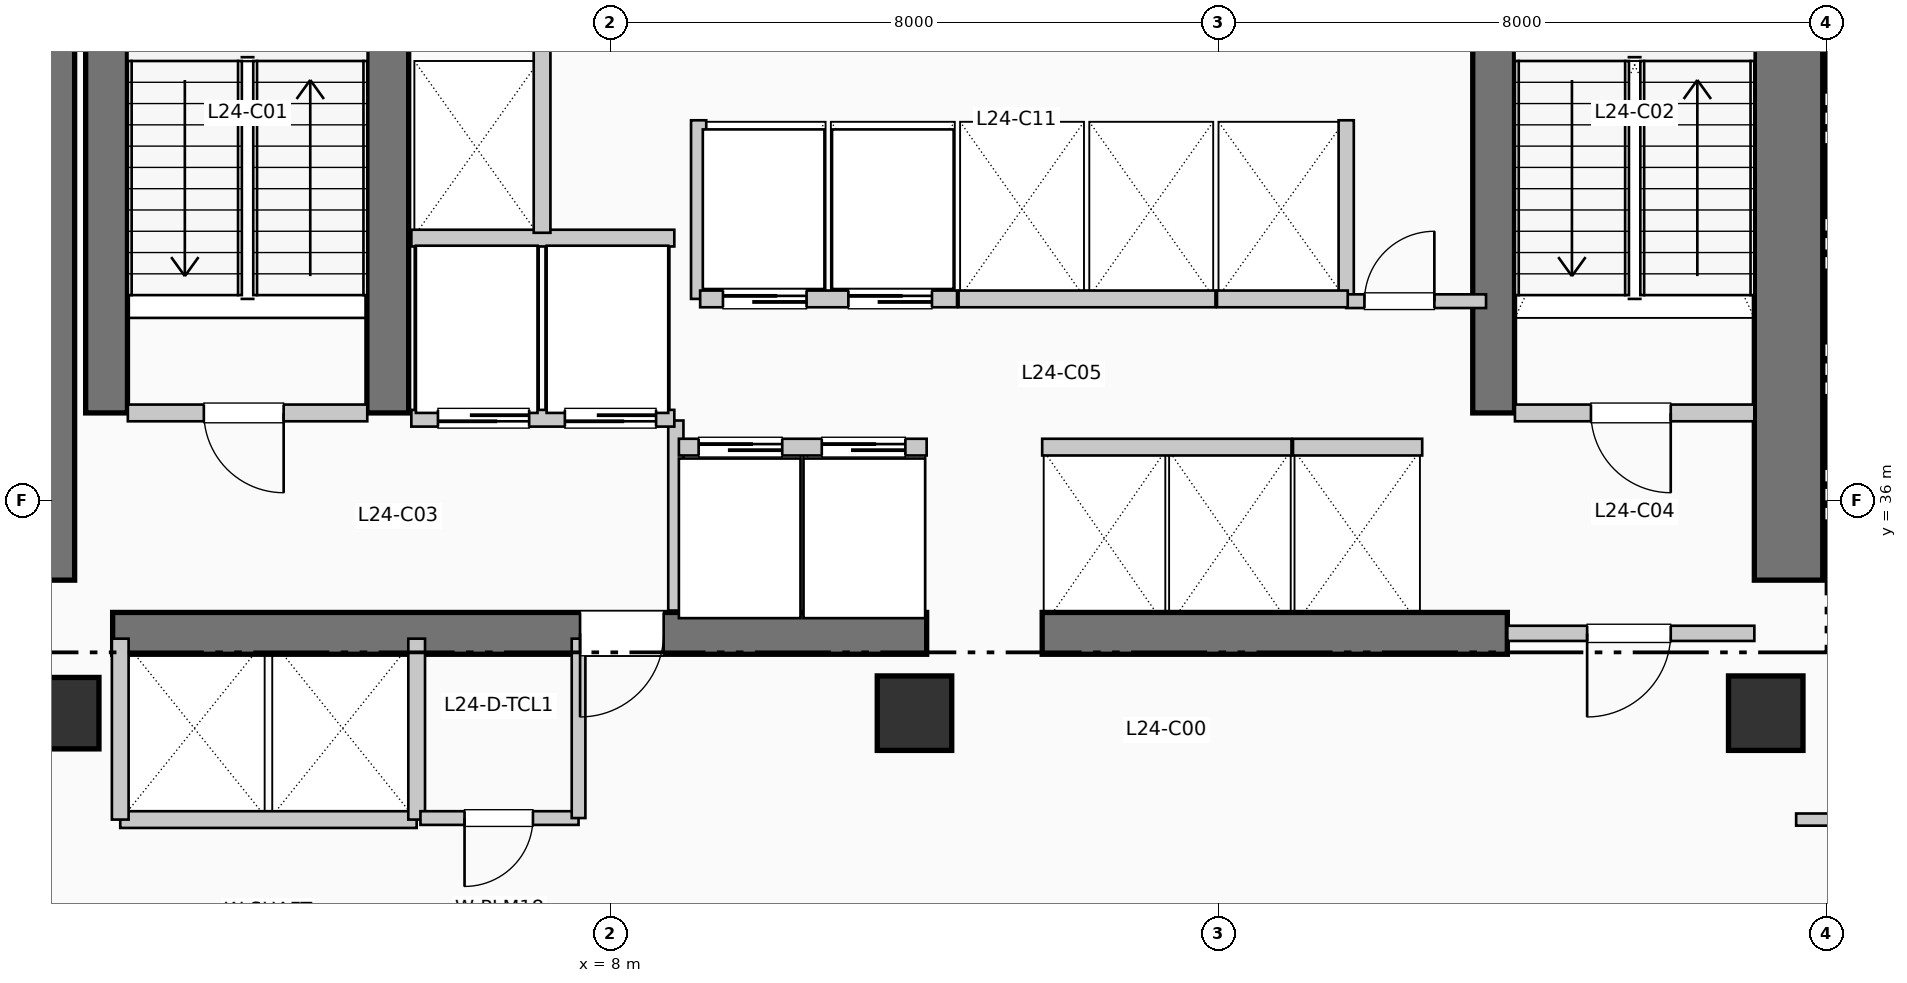
"""IFC4 building model, lengths in metres.
Left out: names, types, materials, properties, quantities, classifications, styles, units other than length and angle.
Written with IfcOpenShell. Run it as: python <this file> out.ifc"""

import sys

from ifc_helpers import new_model, si_unit, direction, frame, frame_2d, origin, origin_2d, place, context, subcontext, project, spatial, rectangle, extrude, element, fill, save


model = new_model("IFC4")
c1 = context("Model", 3, precision=1e-05, world=origin(), true_north=direction((0.0, 1.0)))
c2 = subcontext(c1, "Body", "Model", "MODEL_VIEW")
j1 = project(units=[si_unit("LENGTHUNIT", "METRE"), si_unit("PLANEANGLEUNIT", "RADIAN")], contexts=[c1])
p1 = place(None, origin())
s1 = spatial("IfcSite", under=j1, at=p1, CompositionType="ELEMENT")
p2 = place(p1, origin())
s2 = spatial("IfcBuilding", under=s1, at=p2, CompositionType="ELEMENT")
p3 = place(p2, frame((0.0, 0.0, 102.63)))
s3 = spatial("IfcBuildingStorey", under=s2, at=p3, CompositionType="ELEMENT", Elevation=102.63)
p4 = place(p3, frame((0.5, 34.95, 0.0), z_axis=(0.0, 0.0, 1.0), x_axis=(0.0, 1.0, 0.0)))
e1 = element("IfcWall", 1, at=p4, inside=s3, PredefinedType="SHEAR", context=c2, shape_type="SweptSolid", body=[
    extrude(rectangle(XDim=7.9, YDim=0.9, at=frame_2d((3.95, 0.0))), origin(), (0.0, 0.0, 1.0), 3.96),
])
p5 = place(p3, frame((23.5, 34.95, 0.0), z_axis=(0.0, 0.0, 1.0), x_axis=(0.0, 1.0, 0.0)))
e2 = element("IfcWall", 2, at=p5, inside=s3, PredefinedType="SHEAR", context=c2, shape_type="SweptSolid", body=[
    extrude(rectangle(XDim=10.64, YDim=0.9, at=frame_2d((5.32, 0.0))), origin(), (0.0, 0.0, 1.0), 3.96),
])
p6 = place(p3, frame((1.45, 34.25, 0.0), z_axis=(0.0, 0.0, 1.0), x_axis=(1.0, 0.0, 0.0)))
e3 = element("IfcWall", 3, at=p6, inside=s3, PredefinedType="SHEAR", context=c2, shape_type="SweptSolid", body=[
    extrude(rectangle(XDim=10.71, YDim=0.55, at=frame_2d((5.355, 0.0))), origin(), (0.0, 0.0, 1.0), 3.96),
])
p7 = place(p6, frame((7.25, 0.0, 0.0), z_axis=(0.0, 0.0, 1.0), x_axis=(-1.0, 0.0, 0.0)))
e4 = element("IfcOpeningElement", 4, at=p7, cuts=e3, PredefinedType="OPENING", context=c2, shape_type="SweptSolid", body=[
    extrude(rectangle(XDim=1.1, YDim=2.15, at=frame_2d((0.55, 1.075))), frame((0.0, 0.285, 0.0), z_axis=(0.0, -1.0, 0.0), x_axis=(1.0, 0.0, 0.0)), (0.0, 0.0, 1.0), 0.57),
])
p8 = place(p3, frame((13.68, 34.25, 0.0), z_axis=(0.0, 0.0, 1.0), x_axis=(1.0, 0.0, 0.0)))
e5 = element("IfcWall", 5, at=p8, inside=s3, PredefinedType="SHEAR", context=c2, shape_type="SweptSolid", body=[
    extrude(rectangle(XDim=6.12, YDim=0.55, at=frame_2d((3.06, 0.0))), origin(), (0.0, 0.0, 1.0), 3.96),
])
for number, where, z_axis, x_axis in (
    (6, (1.37, 37.15, 0.0), (0.0, 0.0, 1.0), (0.0, 1.0, 0.0)),
    (7, (5.07, 37.15, 0.0), (0.0, 0.0, 1.0), (0.0, 1.0, 0.0)),
    (8, (19.62, 37.15, 0.0), (0.0, 0.0, 1.0), (0.0, 1.0, 0.0)),
):
    element("IfcWall", number, at=place(p3, frame(where, z_axis=z_axis, x_axis=x_axis)), inside=s3, PredefinedType="SHEAR", context=c2, shape_type="SweptSolid", body=[
        extrude(rectangle(XDim=7.89, YDim=0.55, at=frame_2d((3.945, 0.0))), origin(), (0.0, 0.0, 1.0), 3.96),
    ])
p9 = place(p3, frame((0.8, 33.2, 0.0), z_axis=(0.0, 0.0, 1.0), x_axis=(1.0, 0.0, 0.0)))
e9 = element("IfcColumn", 9, at=p9, inside=s3, PredefinedType="COLUMN", context=c2, shape_type="SweptSolid", body=[
    extrude(rectangle(XDim=0.94, YDim=0.94, at=origin_2d()), origin(), (0.0, 0.0, 1.0), 3.96),
])
for number, where, z_axis, x_axis in (
    (10, (12.0, 33.2, 0.0), (0.0, 0.0, 1.0), (1.0, 0.0, 0.0)),
    (11, (23.2, 33.2, 0.0), (0.0, 0.0, 1.0), (1.0, 0.0, 0.0)),
):
    element("IfcColumn", number, at=place(p3, frame(where, z_axis=z_axis, x_axis=x_axis)), inside=s3, PredefinedType="COLUMN", context=c2, shape_type="SweptSolid", body=[
        extrude(rectangle(XDim=0.98, YDim=0.98, at=origin_2d()), origin(), (0.0, 0.0, 1.0), 3.96),
    ])
p10 = place(p3, frame((1.65, 37.15, 0.0), z_axis=(0.0, 0.0, 1.0), x_axis=(1.0, 0.0, 0.0)))
e12 = element("IfcWall", 12, at=p10, inside=s3, PredefinedType="PARTITIONING", context=c2, shape_type="SweptSolid", body=[
    extrude(rectangle(XDim=3.15, YDim=0.22, at=frame_2d((1.575, 0.0))), origin(), (0.0, 0.0, 1.0), 3.71),
])
p11 = place(p10, frame((2.05, 0.0, 0.0), z_axis=(0.0, 0.0, 1.0), x_axis=(-1.0, 0.0, 0.0)))
e13 = element("IfcOpeningElement", 13, at=p11, cuts=e12, PredefinedType="OPENING", context=c2, shape_type="SweptSolid", body=[
    extrude(rectangle(XDim=1.05, YDim=2.15, at=frame_2d((0.525, 1.075))), frame((0.0, 0.12, 0.0), z_axis=(0.0, -1.0, 0.0), x_axis=(1.0, 0.0, 0.0)), (0.0, 0.0, 1.0), 0.24),
])
p12 = place(p3, frame((8.86, 34.55, 0.0), z_axis=(0.0, 0.0, 1.0), x_axis=(0.0, 1.0, 0.0)))
e14 = element("IfcWall", 14, at=p12, inside=s3, PredefinedType="PARTITIONING", context=c2, shape_type="SweptSolid", body=[
    extrude(rectangle(XDim=2.5, YDim=0.2, at=frame_2d((1.25, 0.0))), origin(), (0.0, 0.0, 1.0), 3.71),
])
p13 = place(p3, frame((19.9, 37.15, 0.0), z_axis=(0.0, 0.0, 1.0), x_axis=(1.0, 0.0, 0.0)))
e15 = element("IfcWall", 15, at=p13, inside=s3, PredefinedType="PARTITIONING", context=c2, shape_type="SweptSolid", body=[
    extrude(rectangle(XDim=3.15, YDim=0.22, at=frame_2d((1.575, 0.0))), origin(), (0.0, 0.0, 1.0), 3.71),
])
p14 = place(p13, frame((2.05, 0.0, 0.0), z_axis=(0.0, 0.0, 1.0), x_axis=(-1.0, 0.0, 0.0)))
e16 = element("IfcOpeningElement", 16, at=p14, cuts=e15, PredefinedType="OPENING", context=c2, shape_type="SweptSolid", body=[
    extrude(rectangle(XDim=1.05, YDim=2.15, at=frame_2d((0.525, 1.075))), frame((0.0, 0.12, 0.0), z_axis=(0.0, -1.0, 0.0), x_axis=(1.0, 0.0, 0.0)), (0.0, 0.0, 1.0), 0.24),
])
p15 = place(p3, frame((19.8, 34.25, 0.0), z_axis=(0.0, 0.0, 1.0), x_axis=(1.0, 0.0, 0.0)))
e17 = element("IfcWall", 17, at=p15, inside=s3, PredefinedType="PARTITIONING", context=c2, shape_type="SweptSolid", body=[
    extrude(rectangle(XDim=3.25, YDim=0.2, at=frame_2d((1.625, 0.0))), origin(), (0.0, 0.0, 1.0), 3.71),
])
p16 = place(p15, frame((2.15, 0.0, 0.0), z_axis=(0.0, 0.0, 1.0), x_axis=(-1.0, 0.0, 0.0)))
e18 = element("IfcOpeningElement", 18, at=p16, cuts=e17, PredefinedType="OPENING", context=c2, shape_type="SweptSolid", body=[
    extrude(rectangle(XDim=1.1, YDim=2.15, at=frame_2d((0.55, 1.075))), frame((0.0, 0.11, 0.0), z_axis=(0.0, -1.0, 0.0), x_axis=(1.0, 0.0, 0.0)), (0.0, 0.0, 1.0), 0.22),
])
p17 = place(p3, frame((5.38, 37.08, 0.0), z_axis=(0.0, 0.0, 1.0), x_axis=(1.0, 0.0, 0.0)))
e19 = element("IfcWall", 19, at=p17, inside=s3, PredefinedType="PARTITIONING", context=c2, shape_type="SweptSolid", body=[
    extrude(rectangle(XDim=3.46, YDim=0.22, at=frame_2d((1.73, 0.0))), origin(), (0.0, 0.0, 1.0), 3.71),
])
p18 = place(p17, frame((1.55, 0.0, 0.0), z_axis=(0.0, 0.0, 1.0), x_axis=(-1.0, 0.0, 0.0)))
e20 = element("IfcOpeningElement", 20, at=p18, cuts=e19, PredefinedType="OPENING", context=c2, shape_type="SweptSolid", body=[
    extrude(rectangle(XDim=1.2, YDim=2.2, at=frame_2d((0.6, 1.1))), frame((0.0, 0.12, 0.0), z_axis=(0.0, -1.0, 0.0), x_axis=(1.0, 0.0, 0.0)), (0.0, 0.0, 1.0), 0.24),
])
p19 = place(p17, frame((3.22, 0.0, 0.0), z_axis=(0.0, 0.0, 1.0), x_axis=(-1.0, 0.0, 0.0)))
e21 = element("IfcOpeningElement", 21, at=p19, cuts=e19, PredefinedType="OPENING", context=c2, shape_type="SweptSolid", body=[
    extrude(rectangle(XDim=1.2, YDim=2.2, at=frame_2d((0.6, 1.1))), frame((0.0, 0.12, 0.0), z_axis=(0.0, -1.0, 0.0), x_axis=(1.0, 0.0, 0.0)), (0.0, 0.0, 1.0), 0.24),
])
p20 = place(p3, frame((5.38, 39.45, 0.0), z_axis=(0.0, 0.0, 1.0), x_axis=(1.0, 0.0, 0.0)))
e22 = element("IfcWall", 22, at=p20, inside=s3, PredefinedType="PARTITIONING", context=c2, shape_type="SweptSolid", body=[
    extrude(rectangle(XDim=3.46, YDim=0.22, at=frame_2d((1.73, 0.0))), origin(), (0.0, 0.0, 1.0), 3.71),
])
p21 = place(p3, frame((7.1, 39.52, 0.0), z_axis=(0.0, 0.0, 1.0), x_axis=(0.0, 1.0, 0.0)))
e23 = element("IfcWall", 23, at=p21, inside=s3, PredefinedType="PARTITIONING", context=c2, shape_type="SweptSolid", body=[
    extrude(rectangle(XDim=2.93, YDim=0.22, at=frame_2d((1.465, 0.0))), origin(), (0.0, 0.0, 1.0), 3.71),
])
p22 = place(p3, frame((1.55, 31.8, 0.0), z_axis=(0.0, 0.0, 1.0), x_axis=(1.0, 0.0, 0.0)))
e24 = element("IfcWall", 24, at=p22, inside=s3, PredefinedType="PARTITIONING", context=c2, shape_type="SweptSolid", body=[
    extrude(rectangle(XDim=3.9, YDim=0.22, at=frame_2d((1.95, 0.0))), origin(), (0.0, 0.0, 1.0), 3.71),
])
for number, where, z_axis, x_axis in (
    (25, (1.55, 31.8, 0.0), (0.0, 0.0, 1.0), (0.0, 1.0, 0.0)),
    (26, (5.45, 31.8, 0.0), (0.0, 0.0, 1.0), (0.0, 1.0, 0.0)),
):
    element("IfcWall", number, at=place(p3, frame(where, z_axis=z_axis, x_axis=x_axis)), inside=s3, PredefinedType="PARTITIONING", context=c2, shape_type="SweptSolid", body=[
        extrude(rectangle(XDim=2.38, YDim=0.22, at=frame_2d((1.19, 0.0))), origin(), (0.0, 0.0, 1.0), 3.71),
    ])
for number, where, z_axis, x_axis in (
    (27, (9.16, 38.65, 0.0), (0.0, 0.0, 1.0), (0.0, 1.0, 0.0)),
    (28, (17.68, 38.65, 0.0), (0.0, 0.0, 1.0), (0.0, 1.0, 0.0)),
):
    element("IfcWall", number, at=place(p3, frame(where, z_axis=z_axis, x_axis=x_axis)), inside=s3, PredefinedType="PARTITIONING", context=c2, shape_type="SweptSolid", body=[
        extrude(rectangle(XDim=2.35, YDim=0.2, at=frame_2d((1.175, 0.0))), origin(), (0.0, 0.0, 1.0), 3.71),
    ])
p23 = place(p3, frame((17.68, 38.62, 0.0), z_axis=(0.0, 0.0, 1.0), x_axis=(1.0, 0.0, 0.0)))
e29 = element("IfcWall", 29, at=p23, inside=s3, PredefinedType="PARTITIONING", context=c2, shape_type="SweptSolid", body=[
    extrude(rectangle(XDim=1.84, YDim=0.18, at=frame_2d((0.92, 0.0))), origin(), (0.0, 0.0, 1.0), 3.71),
])
p24 = place(p23, frame((0.24, 0.0, 0.0)))
e30 = element("IfcOpeningElement", 30, at=p24, cuts=e29, PredefinedType="OPENING", context=c2, shape_type="SweptSolid", body=[
    extrude(rectangle(XDim=0.92, YDim=2.1, at=frame_2d((0.46, 1.05))), frame((0.0, 0.1, 0.0), z_axis=(0.0, -1.0, 0.0), x_axis=(1.0, 0.0, 0.0)), (0.0, 0.0, 1.0), 0.2),
])
p25 = place(p3, frame((5.5, 31.82, 0.0), z_axis=(0.0, 0.0, 1.0), x_axis=(1.0, 0.0, 0.0)))
e31 = element("IfcWall", 31, at=p25, inside=s3, PredefinedType="PLUMBINGWALL", context=c2, shape_type="SweptSolid", body=[
    extrude(rectangle(XDim=2.08, YDim=0.18, at=frame_2d((1.04, 0.0))), origin(), (0.0, 0.0, 1.0), 3.71),
])
p26 = place(p25, frame((1.48, 0.0, 0.0), z_axis=(0.0, 0.0, 1.0), x_axis=(-1.0, 0.0, 0.0)))
e32 = element("IfcOpeningElement", 32, at=p26, cuts=e31, PredefinedType="OPENING", context=c2, shape_type="SweptSolid", body=[
    extrude(rectangle(XDim=0.9, YDim=2.1, at=frame_2d((0.45, 1.05))), frame((0.0, 0.1, 0.0), z_axis=(0.0, -1.0, 0.0), x_axis=(1.0, 0.0, 0.0)), (0.0, 0.0, 1.0), 0.2),
])
p27 = place(p3, frame((7.58, 31.82, 0.0), z_axis=(0.0, 0.0, 1.0), x_axis=(0.0, 1.0, 0.0)))
e33 = element("IfcWall", 33, at=p27, inside=s3, PredefinedType="PLUMBINGWALL", context=c2, shape_type="SweptSolid", body=[
    extrude(rectangle(XDim=2.36, YDim=0.18, at=frame_2d((1.18, 0.0))), origin(), (0.0, 0.0, 1.0), 3.71),
])
p28 = place(p3, frame((8.9, 36.7, 0.0), z_axis=(0.0, 0.0, 1.0), x_axis=(1.0, 0.0, 0.0)))
e34 = element("IfcWall", 34, at=p28, inside=s3, PredefinedType="PARTITIONING", context=c2, shape_type="SweptSolid", body=[
    extrude(rectangle(XDim=3.26, YDim=0.22, at=frame_2d((1.63, 0.0))), origin(), (0.0, 0.0, 1.0), 3.71),
])
p29 = place(p28, frame((0.26, 0.0, 0.0)))
e35 = element("IfcOpeningElement", 35, at=p29, cuts=e34, PredefinedType="OPENING", context=c2, shape_type="SweptSolid", body=[
    extrude(rectangle(XDim=1.1, YDim=2.2, at=frame_2d((0.55, 1.1))), frame((0.0, 0.12, 0.0), z_axis=(0.0, -1.0, 0.0), x_axis=(1.0, 0.0, 0.0)), (0.0, 0.0, 1.0), 0.24),
])
p30 = place(p28, frame((1.88, 0.0, 0.0)))
e36 = element("IfcOpeningElement", 36, at=p30, cuts=e34, PredefinedType="OPENING", context=c2, shape_type="SweptSolid", body=[
    extrude(rectangle(XDim=1.1, YDim=2.2, at=frame_2d((0.55, 1.1))), frame((0.0, 0.12, 0.0), z_axis=(0.0, -1.0, 0.0), x_axis=(1.0, 0.0, 0.0)), (0.0, 0.0, 1.0), 0.24),
])
p31 = place(p3, frame((9.18, 38.65, 0.0), z_axis=(0.0, 0.0, 1.0), x_axis=(1.0, 0.0, 0.0)))
e37 = element("IfcWall", 37, at=p31, inside=s3, PredefinedType="PARTITIONING", context=c2, shape_type="SweptSolid", body=[
    extrude(rectangle(XDim=3.38, YDim=0.22, at=frame_2d((1.69, 0.0))), origin(), (0.0, 0.0, 1.0), 3.71),
])
p32 = place(p31, frame((0.3, 0.0, 0.0)))
e38 = element("IfcOpeningElement", 38, at=p32, cuts=e37, PredefinedType="OPENING", context=c2, shape_type="SweptSolid", body=[
    extrude(rectangle(XDim=1.1, YDim=2.2, at=frame_2d((0.55, 1.1))), frame((0.0, 0.12, 0.0), z_axis=(0.0, -1.0, 0.0), x_axis=(1.0, 0.0, 0.0)), (0.0, 0.0, 1.0), 0.24),
])
p33 = place(p31, frame((1.95, 0.0, 0.0)))
e39 = element("IfcOpeningElement", 39, at=p33, cuts=e37, PredefinedType="OPENING", context=c2, shape_type="SweptSolid", body=[
    extrude(rectangle(XDim=1.1, YDim=2.2, at=frame_2d((0.55, 1.1))), frame((0.0, 0.12, 0.0), z_axis=(0.0, -1.0, 0.0), x_axis=(1.0, 0.0, 0.0)), (0.0, 0.0, 1.0), 0.24),
])
p34 = place(p3, frame((13.68, 36.7, 0.0), z_axis=(0.0, 0.0, 1.0), x_axis=(1.0, 0.0, 0.0)))
e40 = element("IfcWall", 40, at=p34, inside=s3, PredefinedType="PARTITIONING", context=c2, shape_type="SweptSolid", body=[
    extrude(rectangle(XDim=3.28, YDim=0.22, at=frame_2d((1.64, 0.0))), origin(), (0.0, 0.0, 1.0), 3.71),
])
p35 = place(p3, frame((12.58, 38.65, 0.0), z_axis=(0.0, 0.0, 1.0), x_axis=(1.0, 0.0, 0.0)))
e41 = element("IfcWall", 41, at=p35, inside=s3, PredefinedType="PARTITIONING", context=c2, shape_type="SweptSolid", body=[
    extrude(rectangle(XDim=3.38, YDim=0.22, at=frame_2d((1.69, 0.0))), origin(), (0.0, 0.0, 1.0), 3.71),
])
p36 = place(p3, frame((16.98, 36.7, 0.0), z_axis=(0.0, 0.0, 1.0), x_axis=(1.0, 0.0, 0.0)))
e42 = element("IfcWall", 42, at=p36, inside=s3, PredefinedType="PARTITIONING", context=c2, shape_type="SweptSolid", body=[
    extrude(rectangle(XDim=1.7, YDim=0.22, at=frame_2d((0.85, 0.0))), origin(), (0.0, 0.0, 1.0), 3.71),
])
p37 = place(p3, frame((15.98, 38.65, 0.0), z_axis=(0.0, 0.0, 1.0), x_axis=(1.0, 0.0, 0.0)))
e43 = element("IfcWall", 43, at=p37, inside=s3, PredefinedType="PARTITIONING", context=c2, shape_type="SweptSolid", body=[
    extrude(rectangle(XDim=1.72, YDim=0.22, at=frame_2d((0.86, 0.0))), origin(), (0.0, 0.0, 1.0), 3.71),
])
p38 = place(p3, frame((23.6, 31.8, 0.0), z_axis=(0.0, 0.0, 1.0), x_axis=(1.0, 0.0, 0.0)))
e44 = element("IfcWall", 44, at=p38, inside=s3, PredefinedType="PARTITIONING", context=c2, shape_type="SweptSolid", body=[
    extrude(rectangle(XDim=32.21, YDim=0.16, at=frame_2d((16.105, 0.0))), origin(), (0.0, 0.0, 1.0), 3.71),
])
p39 = place(p38, frame((8.255, 0.0, 0.0)))
e45 = element("IfcOpeningElement", 45, at=p39, cuts=e44, PredefinedType="OPENING", context=c2, shape_type="SweptSolid", body=[
    extrude(rectangle(XDim=0.95, YDim=2.15, at=frame_2d((0.475, 1.075))), frame((0.0, 0.09, 0.0), z_axis=(0.0, -1.0, 0.0), x_axis=(1.0, 0.0, 0.0)), (0.0, 0.0, 1.0), 0.18),
])
p40 = place(p38, frame((23.36, 0.0, 0.0)))
e46 = element("IfcOpeningElement", 46, at=p40, cuts=e44, PredefinedType="OPENING", context=c2, shape_type="SweptSolid", body=[
    extrude(rectangle(XDim=0.95, YDim=2.15, at=frame_2d((0.475, 1.075))), frame((0.0, 0.09, 0.0), z_axis=(0.0, -1.0, 0.0), x_axis=(1.0, 0.0, 0.0)), (0.0, 0.0, 1.0), 0.18),
])
p41 = place(p11, origin())
e47 = element("IfcDoor", 47, at=p41, inside=s3, OperationType="SINGLE_SWING_RIGHT", PredefinedType="DOOR", context=c2, shape_type="SweptSolid", body=[
    extrude(rectangle(XDim=1.05, YDim=2.15, at=frame_2d((0.525, 1.075))), frame((0.0, 0.025, 0.0), z_axis=(0.0, -1.0, 0.0), x_axis=(1.0, 0.0, 0.0)), (0.0, 0.0, 1.0), 0.05),
])
fill(e13, e47)
p42 = place(p7, origin())
e48 = element("IfcDoor", 48, at=p42, inside=s3, OperationType="SINGLE_SWING_LEFT", PredefinedType="DOOR", context=c2, shape_type="SweptSolid", body=[
    extrude(rectangle(XDim=1.1, YDim=2.15, at=frame_2d((0.55, 1.075))), frame((0.0, 0.025, 0.0), z_axis=(0.0, -1.0, 0.0), x_axis=(1.0, 0.0, 0.0)), (0.0, 0.0, 1.0), 0.05),
])
fill(e4, e48)
p43 = place(p14, origin())
e49 = element("IfcDoor", 49, at=p43, inside=s3, OperationType="SINGLE_SWING_RIGHT", PredefinedType="DOOR", context=c2, shape_type="SweptSolid", body=[
    extrude(rectangle(XDim=1.05, YDim=2.15, at=frame_2d((0.525, 1.075))), frame((0.0, 0.025, 0.0), z_axis=(0.0, -1.0, 0.0), x_axis=(1.0, 0.0, 0.0)), (0.0, 0.0, 1.0), 0.05),
])
fill(e16, e49)
p44 = place(p16, origin())
e50 = element("IfcDoor", 50, at=p44, inside=s3, OperationType="SINGLE_SWING_LEFT", PredefinedType="DOOR", context=c2, shape_type="SweptSolid", body=[
    extrude(rectangle(XDim=1.1, YDim=2.15, at=frame_2d((0.55, 1.075))), frame((0.0, 0.025, 0.0), z_axis=(0.0, -1.0, 0.0), x_axis=(1.0, 0.0, 0.0)), (0.0, 0.0, 1.0), 0.05),
])
fill(e18, e50)
p45 = place(p18, origin())
e51 = element("IfcDoor", 51, at=p45, inside=s3, OperationType="SLIDING_TO_RIGHT", PredefinedType="DOOR", context=c2, shape_type="SweptSolid", body=[
    extrude(rectangle(XDim=1.2, YDim=2.2, at=frame_2d((0.6, 1.1))), frame((0.0, 0.025, 0.0), z_axis=(0.0, -1.0, 0.0), x_axis=(1.0, 0.0, 0.0)), (0.0, 0.0, 1.0), 0.05),
])
fill(e20, e51)
p46 = place(p19, origin())
e52 = element("IfcDoor", 52, at=p46, inside=s3, OperationType="SLIDING_TO_RIGHT", PredefinedType="DOOR", context=c2, shape_type="SweptSolid", body=[
    extrude(rectangle(XDim=1.2, YDim=2.2, at=frame_2d((0.6, 1.1))), frame((0.0, 0.025, 0.0), z_axis=(0.0, -1.0, 0.0), x_axis=(1.0, 0.0, 0.0)), (0.0, 0.0, 1.0), 0.05),
])
fill(e21, e52)
p47 = place(p24, origin())
e53 = element("IfcDoor", 53, at=p47, inside=s3, OperationType="SINGLE_SWING_RIGHT", PredefinedType="DOOR", context=c2, shape_type="SweptSolid", body=[
    extrude(rectangle(XDim=0.92, YDim=2.1, at=frame_2d((0.46, 1.05))), frame((0.0, 0.025, 0.0), z_axis=(0.0, -1.0, 0.0), x_axis=(1.0, 0.0, 0.0)), (0.0, 0.0, 1.0), 0.05),
])
fill(e30, e53)
p48 = place(p26, origin())
e54 = element("IfcDoor", 54, at=p48, inside=s3, OperationType="SINGLE_SWING_LEFT", PredefinedType="DOOR", context=c2, shape_type="SweptSolid", body=[
    extrude(rectangle(XDim=0.9, YDim=2.1, at=frame_2d((0.45, 1.05))), frame((0.0, 0.025, 0.0), z_axis=(0.0, -1.0, 0.0), x_axis=(1.0, 0.0, 0.0)), (0.0, 0.0, 1.0), 0.05),
])
fill(e32, e54)
p49 = place(p29, origin())
e55 = element("IfcDoor", 55, at=p49, inside=s3, OperationType="SLIDING_TO_LEFT", PredefinedType="DOOR", context=c2, shape_type="SweptSolid", body=[
    extrude(rectangle(XDim=1.1, YDim=2.2, at=frame_2d((0.55, 1.1))), frame((0.0, 0.025, 0.0), z_axis=(0.0, -1.0, 0.0), x_axis=(1.0, 0.0, 0.0)), (0.0, 0.0, 1.0), 0.05),
])
fill(e35, e55)
p50 = place(p30, origin())
e56 = element("IfcDoor", 56, at=p50, inside=s3, OperationType="SLIDING_TO_LEFT", PredefinedType="DOOR", context=c2, shape_type="SweptSolid", body=[
    extrude(rectangle(XDim=1.1, YDim=2.2, at=frame_2d((0.55, 1.1))), frame((0.0, 0.025, 0.0), z_axis=(0.0, -1.0, 0.0), x_axis=(1.0, 0.0, 0.0)), (0.0, 0.0, 1.0), 0.05),
])
fill(e36, e56)
p51 = place(p32, origin())
e57 = element("IfcDoor", 57, at=p51, inside=s3, OperationType="SLIDING_TO_LEFT", PredefinedType="DOOR", context=c2, shape_type="SweptSolid", body=[
    extrude(rectangle(XDim=1.1, YDim=2.2, at=frame_2d((0.55, 1.1))), frame((0.0, 0.025, 0.0), z_axis=(0.0, -1.0, 0.0), x_axis=(1.0, 0.0, 0.0)), (0.0, 0.0, 1.0), 0.05),
])
fill(e38, e57)
p52 = place(p33, origin())
e58 = element("IfcDoor", 58, at=p52, inside=s3, OperationType="SLIDING_TO_LEFT", PredefinedType="DOOR", context=c2, shape_type="SweptSolid", body=[
    extrude(rectangle(XDim=1.1, YDim=2.2, at=frame_2d((0.55, 1.1))), frame((0.0, 0.025, 0.0), z_axis=(0.0, -1.0, 0.0), x_axis=(1.0, 0.0, 0.0)), (0.0, 0.0, 1.0), 0.05),
])
fill(e39, e58)
save(model, sys.argv[1])
